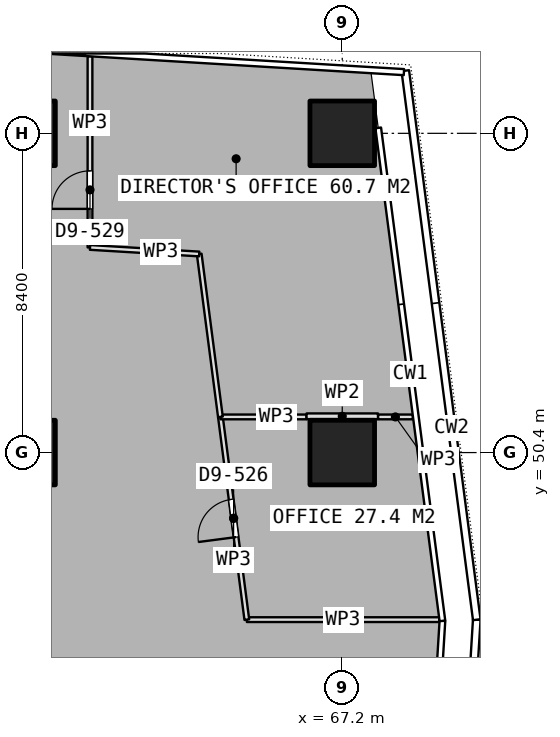
"""IFC4 building model, lengths in metres.
Left out: names, types, materials, properties, quantities, classifications, styles, units other than length and angle.
Written with IfcOpenShell. Run it as: python <this file> out.ifc"""

import sys

from ifc_helpers import new_model, si_unit, direction, frame, frame_2d, origin, origin_2d, place, context, subcontext, project, spatial, rectangle, extrude, element, fill, save


model = new_model("IFC4")
c1 = context("Model", 3, precision=1e-05, world=origin(), true_north=direction((0.0, 1.0)))
c2 = subcontext(c1, "Body", "Model", "MODEL_VIEW")
j1 = project(units=[si_unit("LENGTHUNIT", "METRE"), si_unit("PLANEANGLEUNIT", "RADIAN")], contexts=[c1])
p1 = place(None, origin())
s1 = spatial("IfcSite", under=j1, at=p1, CompositionType="ELEMENT")
p2 = place(p1, origin())
s2 = spatial("IfcBuilding", under=s1, at=p2, CompositionType="ELEMENT")
p3 = place(p2, frame((0.0, 0.0, 132.8)))
s3 = spatial("IfcBuildingStorey", under=s2, at=p3, CompositionType="ELEMENT", Elevation=132.8)
for number, where, z_axis, x_axis in (
    (1, (58.8, 50.4, 0.0), (0.0, 0.0, 1.0), (1.0, 0.0, 0.0)),
    (2, (58.8, 58.8, 0.0), (0.0, 0.0, 1.0), (1.0, 0.0, 0.0)),
    (3, (67.2, 50.4, 0.0), (0.0, 0.0, 1.0), (1.0, 0.0, 0.0)),
    (4, (67.2, 58.8, 0.0), (0.0, 0.0, 1.0), (1.0, 0.0, 0.0)),
):
    element("IfcColumn", number, at=place(p3, frame(where, z_axis=z_axis, x_axis=x_axis)), inside=s3, PredefinedType="COLUMN", context=c2, shape_type="SweptSolid", body=[
        extrude(rectangle(XDim=1.7, YDim=1.7, at=origin_2d()), origin(), (0.0, 0.0, 1.0), 3.75),
    ])
p4 = place(p3, frame((69.751, 46.004, 0.0), z_axis=(0.0, 0.0, 1.0), x_axis=(-1.0, 0.0, 0.0)))
e5 = element("IfcWall", 5, at=p4, inside=s3, PredefinedType="PARTITIONING", context=c2, shape_type="SweptSolid", body=[
    extrude(rectangle(XDim=5.062, YDim=0.125, at=frame_2d((2.531, 0.0))), origin(), (0.0, 0.0, 1.0), 3.5),
])
p5 = place(p3, frame((64.689, 46.004, 0.0), z_axis=(0.0, 0.0, 1.0), x_axis=(-0.129216941745, 0.991616348174, 0.0)))
e6 = element("IfcWall", 6, at=p5, inside=s3, PredefinedType="PARTITIONING", context=c2, shape_type="SweptSolid", body=[
    extrude(rectangle(XDim=5.379, YDim=0.125, at=frame_2d((2.689, 0.0))), origin(), (0.0, 0.0, 1.0), 3.5),
])
p6 = place(p5, frame((2.19, 0.0, 0.0)))
e7 = element("IfcOpeningElement", 7, at=p6, cuts=e6, PredefinedType="OPENING", context=c2, shape_type="SweptSolid", body=[
    extrude(rectangle(XDim=1.0, YDim=2.1, at=frame_2d((0.5, 1.05))), frame((0.0, 0.073, 0.0), z_axis=(0.0, -1.0, 0.0), x_axis=(1.0, 0.0, 0.0)), (0.0, 0.0, 1.0), 0.145),
])
p7 = place(p3, frame((63.994, 51.338, 0.0), z_axis=(0.0, 0.0, 1.0), x_axis=(1.0, 0.0, 0.0)))
e8 = element("IfcWall", 8, at=p7, inside=s3, PredefinedType="PARTITIONING", context=c2, shape_type="SweptSolid", body=[
    extrude(rectangle(XDim=2.266, YDim=0.125, at=frame_2d((1.133, 0.0))), origin(), (0.0, 0.0, 1.0), 3.5),
])
p8 = place(p3, frame((68.14, 51.338, 0.0), z_axis=(0.0, 0.0, 1.0), x_axis=(1.0, 0.0, 0.0)))
e9 = element("IfcWall", 9, at=p8, inside=s3, PredefinedType="PARTITIONING", context=c2, shape_type="SweptSolid", body=[
    extrude(rectangle(XDim=0.917, YDim=0.125, at=frame_2d((0.458, 0.0))), origin(), (0.0, 0.0, 1.0), 3.5),
])
p9 = place(p3, frame((60.562, 55.798, 0.0), z_axis=(0.0, 0.0, 1.0), x_axis=(0.0, 1.0, 0.0)))
e10 = element("IfcWall", 10, at=p9, inside=s3, PredefinedType="PARTITIONING", context=c2, shape_type="SweptSolid", body=[
    extrude(rectangle(XDim=5.029, YDim=0.125, at=frame_2d((2.514, 0.0))), origin(), (0.0, 0.0, 1.0), 3.5),
])
p10 = place(p9, frame((1.014, 0.0, 0.0)))
e11 = element("IfcOpeningElement", 11, at=p10, cuts=e10, PredefinedType="OPENING", context=c2, shape_type="SweptSolid", body=[
    extrude(rectangle(XDim=1.0, YDim=2.1, at=frame_2d((0.5, 1.05))), frame((0.0, 0.073, 0.0), z_axis=(0.0, -1.0, 0.0), x_axis=(1.0, 0.0, 0.0)), (0.0, 0.0, 1.0), 0.145),
])
p11 = place(p3, frame((63.994, 51.339, 0.0), z_axis=(0.0, 0.0, 1.0), x_axis=(-0.129073541997, 0.991635023966, 0.0)))
e12 = element("IfcWall", 12, at=p11, inside=s3, PredefinedType="PARTITIONING", context=c2, shape_type="SweptSolid", body=[
    extrude(rectangle(XDim=4.322, YDim=0.125, at=frame_2d((2.161, 0.0))), origin(), (0.0, 0.0, 1.0), 3.5),
])
p12 = place(p3, frame((63.436, 55.625, 0.0), z_axis=(0.0, 0.0, 1.0), x_axis=(-0.998191233869, 0.060118721102, 0.0)))
e13 = element("IfcWall", 13, at=p12, inside=s3, PredefinedType="PARTITIONING", context=c2, shape_type="SweptSolid", body=[
    extrude(rectangle(XDim=2.879, YDim=0.125, at=frame_2d((1.439, 0.0))), origin(), (0.0, 0.0, 1.0), 3.5),
])
p13 = place(p3, frame((66.26, 51.355, 0.0), z_axis=(0.0, 0.0, 1.0), x_axis=(1.0, 0.0, 0.0)))
e14 = element("IfcWall", 14, at=p13, inside=s3, PredefinedType="PARTITIONING", context=c2, shape_type="SweptSolid", body=[
    extrude(rectangle(XDim=1.88, YDim=0.15, at=frame_2d((0.94, 0.0))), origin(), (0.0, 0.0, 1.0), 3.5),
])
p14 = place(p6, origin())
e15 = element("IfcDoor", 15, at=p14, inside=s3, OperationType="SINGLE_SWING_LEFT", PredefinedType="DOOR", context=c2, shape_type="SweptSolid", body=[
    extrude(rectangle(XDim=1.0, YDim=2.1, at=frame_2d((0.5, 1.05))), frame((0.0, 0.025, 0.0), z_axis=(0.0, -1.0, 0.0), x_axis=(1.0, 0.0, 0.0)), (0.0, 0.0, 1.0), 0.05),
])
fill(e7, e15)
p15 = place(p10, origin())
e16 = element("IfcDoor", 16, at=p15, inside=s3, OperationType="SINGLE_SWING_LEFT", PredefinedType="DOOR", context=c2, shape_type="SweptSolid", body=[
    extrude(rectangle(XDim=1.0, YDim=2.1, at=frame_2d((0.5, 1.05))), frame((0.0, 0.025, 0.0), z_axis=(0.0, -1.0, 0.0), x_axis=(1.0, 0.0, 0.0)), (0.0, 0.0, 1.0), 0.05),
])
fill(e11, e16)
save(model, sys.argv[1])
